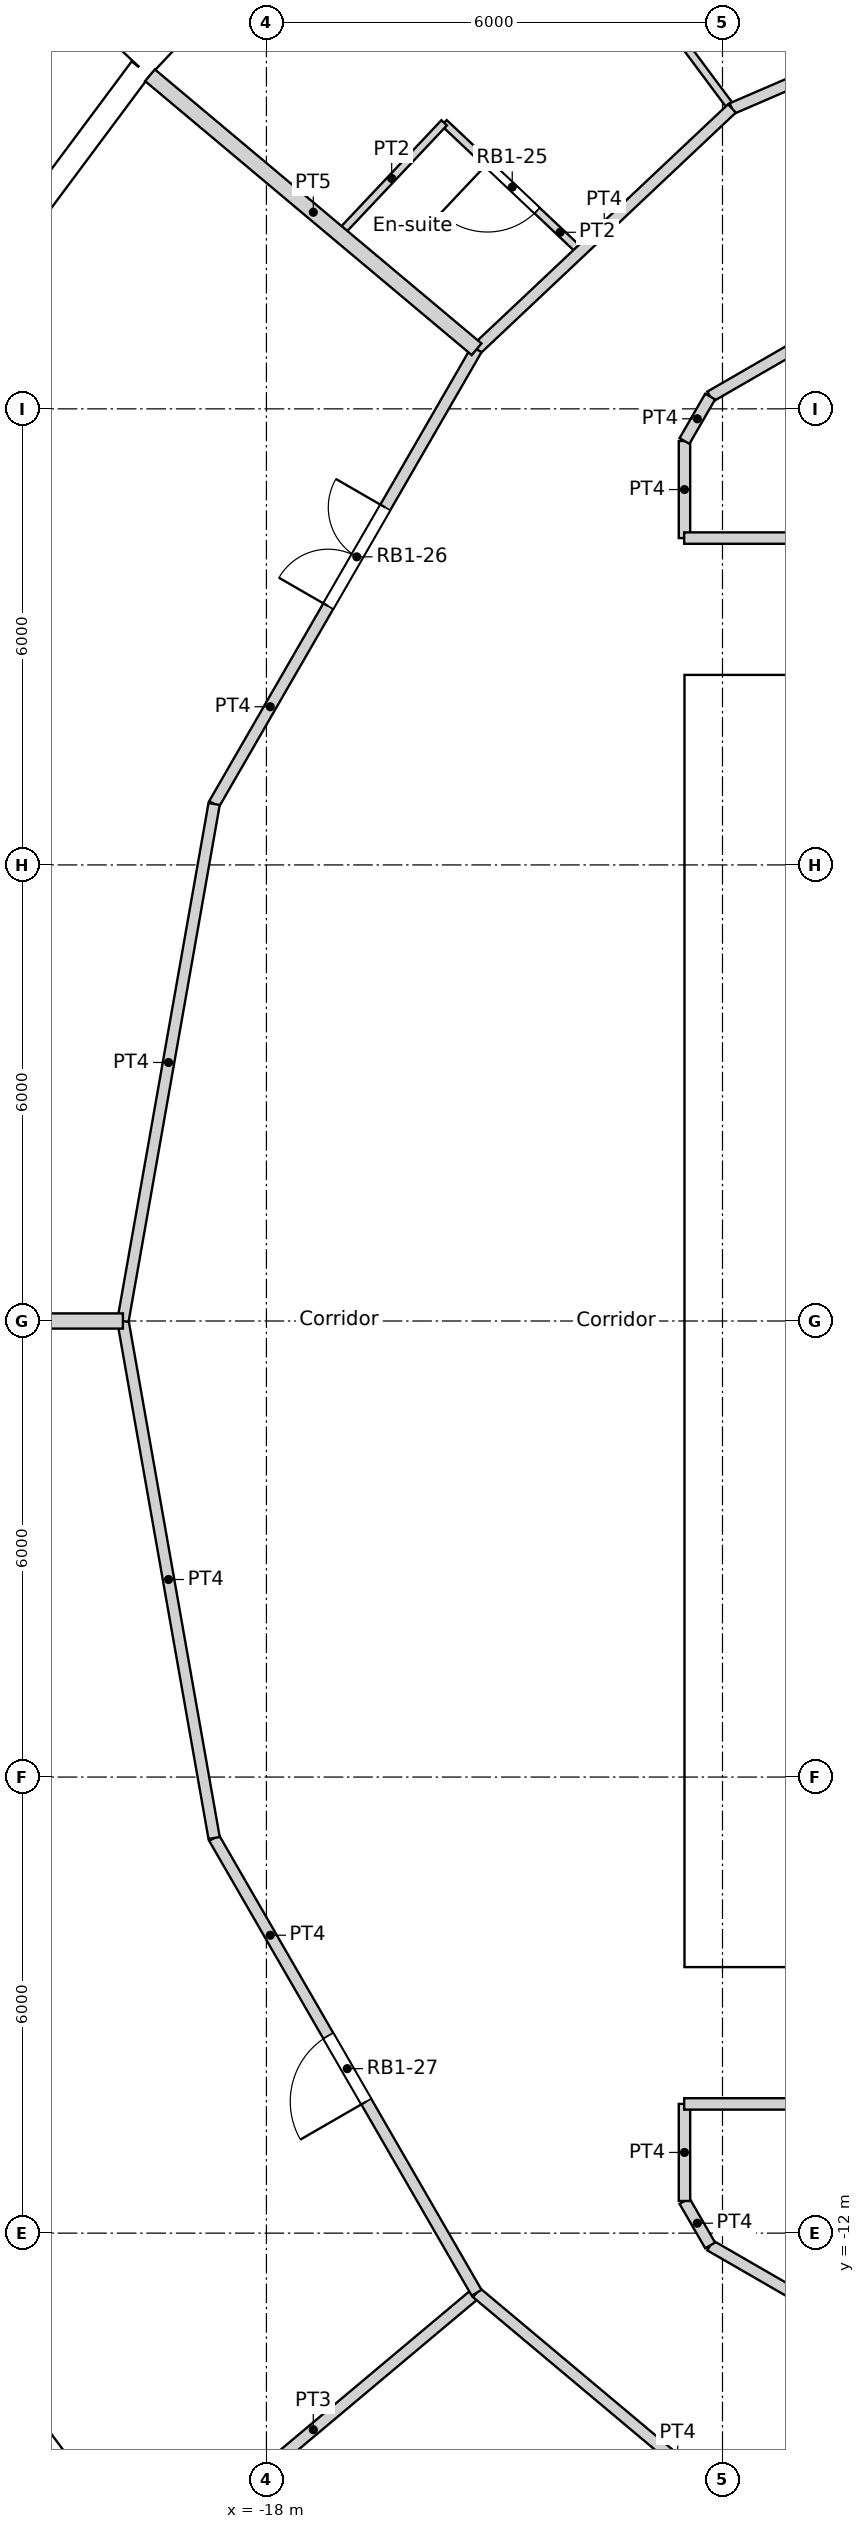
"""IFC4 building model, lengths in metres.
Left out: names, types, materials, properties, quantities, classifications, styles, units other than length and angle.
Written with IfcOpenShell. Run it as: python <this file> out.ifc"""

import sys

from ifc_helpers import new_model, si_unit, direction, frame, frame_2d, origin, origin_2d, place, context, subcontext, project, spatial, rectangle, circle, extrude, element, fill, save


model = new_model("IFC4")
c1 = context("Model", 3, precision=1e-05, world=origin(), true_north=direction((0.0, 1.0)))
c2 = subcontext(c1, "Body", "Model", "MODEL_VIEW")
j1 = project(units=[si_unit("LENGTHUNIT", "METRE"), si_unit("PLANEANGLEUNIT", "RADIAN")], contexts=[c1])
p1 = place(None, origin())
s1 = spatial("IfcSite", under=j1, at=p1, CompositionType="ELEMENT")
p2 = place(p1, origin())
s2 = spatial("IfcBuilding", under=s1, at=p2, CompositionType="ELEMENT")
p3 = place(p2, frame((0.0, 0.0, 126.0)))
s3 = spatial("IfcBuildingStorey", under=s2, at=p3, CompositionType="ELEMENT", Elevation=126.0)
for number, where, z_axis, x_axis in (
    (1, (-20.509, 13.489, 0.0), (0.0, 0.0, 1.0), (1.0, 0.0, 0.0)),
    (2, (-20.509, -13.489, 0.0), (0.0, 0.0, 1.0), (1.0, 0.0, 0.0)),
):
    element("IfcColumn", number, at=place(p3, frame(where, z_axis=z_axis, x_axis=x_axis)), inside=s3, PredefinedType="COLUMN", context=c2, shape_type="SweptSolid", body=[
        extrude(circle(Radius=0.6, at=origin_2d()), origin(), (0.0, 0.0, 1.0), 3.6),
    ])
for number, where, z_axis, x_axis in (
    (3, (-13.798, 12.802, 0.0), (0.0, 0.0, 1.0), (1.0, 0.0, 0.0)),
    (4, (-16.958, 8.167, 0.0), (0.0, 0.0, 1.0), (1.0, 0.0, 0.0)),
    (5, (-18.612, 2.805, 0.0), (0.0, 0.0, 1.0), (1.0, 0.0, 0.0)),
    (6, (-18.612, -2.805, 0.0), (0.0, 0.0, 1.0), (1.0, 0.0, 0.0)),
    (7, (-16.958, -8.167, 0.0), (0.0, 0.0, 1.0), (1.0, 0.0, 0.0)),
    (8, (-13.798, -12.802, 0.0), (0.0, 0.0, 1.0), (1.0, 0.0, 0.0)),
):
    element("IfcColumn", number, at=place(p3, frame(where, z_axis=z_axis, x_axis=x_axis)), inside=s3, PredefinedType="COLUMN", context=c2, shape_type="SweptSolid", body=[
        extrude(circle(Radius=0.65, at=origin_2d()), origin(), (0.0, 0.0, 1.0), 3.6),
    ])
p4 = place(p3, frame((-18.013, 19.056, -0.3), z_axis=(0.0, 0.0, 1.0), x_axis=(-0.686217177108, -0.727396718334, 0.0)))
e9 = element("IfcWall", 9, at=p4, inside=s3, PredefinedType="ELEMENTEDWALL", context=c2, shape_type="SweptSolid", body=[
    extrude(rectangle(XDim=3.0, YDim=1.45, at=frame_2d((1.5, 0.0))), origin(), (0.0, 0.0, 1.0), 3.6),
])
p5 = place(p4, frame((1.5, 0.0, 1.85)))
e10 = element("IfcOpeningElement", 10, at=p5, cuts=e9, PredefinedType="OPENING", context=c2, shape_type="SweptSolid", body=[
    extrude(circle(Radius=0.9, at=origin_2d()), frame((0.0, 0.735, 0.0), z_axis=(0.0, -1.0, 0.0), x_axis=(1.0, 0.0, 0.0)), (0.0, 0.0, 1.0), 1.47),
])
p6 = place(p3, frame((-19.653, 16.478, 0.0), z_axis=(0.0, 0.0, 1.0), x_axis=(-0.597197580538, -0.80209416517, 0.0)))
e11 = element("IfcWall", 11, at=p6, inside=s3, PredefinedType="SOLIDWALL", context=c2, shape_type="SweptSolid", body=[
    extrude(rectangle(XDim=2.973, YDim=0.3, at=frame_2d((1.486, 0.0))), origin(), (0.0, 0.0, 1.0), 3.3),
])
p7 = place(p6, frame((1.486, 0.0, 1.55)))
e12 = element("IfcOpeningElement", 12, at=p7, cuts=e11, PredefinedType="OPENING", context=c2, shape_type="SweptSolid", body=[
    extrude(circle(Radius=0.9, at=origin_2d()), frame((0.0, 0.16, 0.0), z_axis=(0.0, -1.0, 0.0), x_axis=(1.0, 0.0, 0.0)), (0.0, 0.0, 1.0), 0.32),
])
p8 = place(p3, frame((-21.895, -14.43, -0.3), z_axis=(0.0, 0.0, 1.0), x_axis=(0.597183717734, -0.802104486506, 0.0)))
e13 = element("IfcWall", 13, at=p8, inside=s3, PredefinedType="ELEMENTEDWALL", context=c2, shape_type="SweptSolid", body=[
    extrude(rectangle(XDim=3.0, YDim=1.45, at=frame_2d((1.5, 0.0))), origin(), (0.0, 0.0, 1.0), 3.6),
])
p9 = place(p8, frame((1.5, 0.0, 1.85)))
e14 = element("IfcOpeningElement", 14, at=p9, cuts=e13, PredefinedType="OPENING", context=c2, shape_type="SweptSolid", body=[
    extrude(circle(Radius=0.9, at=origin_2d()), frame((0.0, 0.735, 0.0), z_axis=(0.0, -1.0, 0.0), x_axis=(1.0, 0.0, 0.0)), (0.0, 0.0, 1.0), 1.47),
])
p10 = place(p3, frame((-12.5, -8.05, 0.0), z_axis=(0.0, 0.0, 1.0), x_axis=(1.0, 0.0, 0.0)))
e15 = element("IfcWall", 15, at=p10, inside=s3, PredefinedType="SOLIDWALL", context=c2, shape_type="SweptSolid", body=[
    extrude(rectangle(XDim=25.0, YDim=0.9, at=frame_2d((12.5, 0.0))), origin(), (0.0, 0.0, 1.0), 3.6),
])
p11 = place(p10, frame((13.4, 0.0, 0.0)))
e16 = element("IfcOpeningElement", 16, at=p11, cuts=e15, PredefinedType="OPENING", context=c2, shape_type="SweptSolid", body=[
    extrude(rectangle(XDim=1.0, YDim=2.1, at=frame_2d((0.5, 1.05))), frame((0.0, 0.45, 0.0), z_axis=(0.0, -1.0, 0.0), x_axis=(1.0, 0.0, 0.0)), (0.0, 0.0, 1.0), 0.9),
])
p12 = place(p10, frame((8.3, 0.0, 0.0)))
e17 = element("IfcOpeningElement", 17, at=p12, cuts=e15, PredefinedType="OPENING", context=c2, shape_type="SweptSolid", body=[
    extrude(rectangle(XDim=1.8, YDim=2.1, at=frame_2d((0.9, 1.05))), frame((0.0, 0.45, 0.0), z_axis=(0.0, -1.0, 0.0), x_axis=(1.0, 0.0, 0.0)), (0.0, 0.0, 1.0), 0.9),
])
p13 = place(p10, frame((14.9, 0.0, 0.0)))
e18 = element("IfcOpeningElement", 18, at=p13, cuts=e15, PredefinedType="OPENING", context=c2, shape_type="SweptSolid", body=[
    extrude(rectangle(XDim=1.8, YDim=2.1, at=frame_2d((0.9, 1.05))), frame((0.0, 0.45, 0.0), z_axis=(0.0, -1.0, 0.0), x_axis=(1.0, 0.0, 0.0)), (0.0, 0.0, 1.0), 0.9),
])
p14 = place(p3, frame((-12.5, 8.05, 0.0), z_axis=(0.0, 0.0, 1.0), x_axis=(1.0, 0.0, 0.0)))
e19 = element("IfcWall", 19, at=p14, inside=s3, PredefinedType="SOLIDWALL", context=c2, shape_type="SweptSolid", body=[
    extrude(rectangle(XDim=25.0, YDim=0.9, at=frame_2d((12.5, 0.0))), origin(), (0.0, 0.0, 1.0), 3.6),
])
p15 = place(p14, frame((8.3, 0.0, 0.0)))
e20 = element("IfcOpeningElement", 20, at=p15, cuts=e19, PredefinedType="OPENING", context=c2, shape_type="SweptSolid", body=[
    extrude(rectangle(XDim=1.8, YDim=2.1, at=frame_2d((0.9, 1.05))), frame((0.0, 0.45, 0.0), z_axis=(0.0, -1.0, 0.0), x_axis=(1.0, 0.0, 0.0)), (0.0, 0.0, 1.0), 0.9),
])
p16 = place(p3, frame((-12.05, -7.6, 0.0), z_axis=(0.0, 0.0, 1.0), x_axis=(0.0, 1.0, 0.0)))
e21 = element("IfcWall", 21, at=p16, inside=s3, PredefinedType="SOLIDWALL", context=c2, shape_type="SweptSolid", body=[
    extrude(rectangle(XDim=15.2, YDim=0.9, at=frame_2d((7.6, 0.0))), origin(), (0.0, 0.0, 1.0), 3.6),
])
p17 = place(p16, frame((7.1, 0.0, 0.0)))
e22 = element("IfcOpeningElement", 22, at=p17, cuts=e21, PredefinedType="OPENING", context=c2, shape_type="SweptSolid", body=[
    extrude(rectangle(XDim=1.0, YDim=2.1, at=frame_2d((0.5, 1.05))), frame((0.0, 0.45, 0.0), z_axis=(0.0, -1.0, 0.0), x_axis=(1.0, 0.0, 0.0)), (0.0, 0.0, 1.0), 0.9),
])
p18 = place(p3, frame((-11.6, -4.55, 0.0), z_axis=(0.0, 0.0, 1.0), x_axis=(1.0, 0.0, 0.0)))
e23 = element("IfcWall", 23, at=p18, inside=s3, PredefinedType="SOLIDWALL", context=c2, shape_type="SweptSolid", body=[
    extrude(rectangle(XDim=2.4, YDim=0.3, at=frame_2d((1.2, 0.0))), origin(), (0.0, 0.0, 1.0), 3.3),
])
p19 = place(p18, frame((0.65, 0.0, 0.0)))
e24 = element("IfcOpeningElement", 24, at=p19, cuts=e23, PredefinedType="OPENING", context=c2, shape_type="SweptSolid", body=[
    extrude(rectangle(XDim=1.1, YDim=2.1, at=frame_2d((0.55, 1.05))), frame((0.0, 0.15, 0.0), z_axis=(0.0, -1.0, 0.0), x_axis=(1.0, 0.0, 0.0)), (0.0, 0.0, 1.0), 0.3),
])
p20 = place(p3, frame((-11.6, 4.55, 0.0), z_axis=(0.0, 0.0, 1.0), x_axis=(1.0, 0.0, 0.0)))
e25 = element("IfcWall", 25, at=p20, inside=s3, PredefinedType="SOLIDWALL", context=c2, shape_type="SweptSolid", body=[
    extrude(rectangle(XDim=2.4, YDim=0.3, at=frame_2d((1.2, 0.0))), origin(), (0.0, 0.0, 1.0), 3.3),
])
p21 = place(p20, frame((0.65, 0.0, 0.0)))
e26 = element("IfcOpeningElement", 26, at=p21, cuts=e25, PredefinedType="OPENING", context=c2, shape_type="SweptSolid", body=[
    extrude(rectangle(XDim=1.1, YDim=2.1, at=frame_2d((0.55, 1.05))), frame((0.0, 0.15, 0.0), z_axis=(0.0, -1.0, 0.0), x_axis=(1.0, 0.0, 0.0)), (0.0, 0.0, 1.0), 0.3),
])
for number, where, z_axis, x_axis in (
    (27, (-12.504, 10.3, 0.0), (0.0, 0.0, 1.0), (1.0, 0.0, 0.0)),
    (28, (-12.504, -10.3, 0.0), (0.0, 0.0, 1.0), (1.0, 0.0, 0.0)),
):
    element("IfcWall", number, at=place(p3, frame(where, z_axis=z_axis, x_axis=x_axis)), inside=s3, PredefinedType="PARTITIONING", context=c2, shape_type="SweptSolid", body=[
        extrude(rectangle(XDim=7.687, YDim=0.15, at=frame_2d((3.844, 0.0))), origin(), (0.0, 0.0, 1.0), 3.3),
    ])
p22 = place(p3, frame((-12.162, 12.162, 0.0), z_axis=(0.0, 0.0, 1.0), x_axis=(0.866004766557, 0.500035743023, 0.0)))
e29 = element("IfcWall", 29, at=p22, inside=s3, PredefinedType="PARTITIONING", context=c2, shape_type="SweptSolid", body=[
    extrude(rectangle(XDim=8.477, YDim=0.15, at=frame_2d((4.239, 0.0))), origin(), (0.0, 0.0, 1.0), 3.3),
])
p23 = place(p22, frame((3.739, 0.0, 0.0)))
e30 = element("IfcOpeningElement", 30, at=p23, cuts=e29, PredefinedType="OPENING", context=c2, shape_type="SweptSolid", body=[
    extrude(rectangle(XDim=1.0, YDim=2.04, at=frame_2d((0.5, 1.02))), frame((0.0, 0.075, 0.0), z_axis=(0.0, -1.0, 0.0), x_axis=(1.0, 0.0, 0.0)), (0.0, 0.0, 1.0), 0.15),
])
p24 = place(p3, frame((-11.876, 15.952, 0.0), z_axis=(0.0, 0.0, 1.0), x_axis=(0.918189765505, 0.396140826629, 0.0)))
e31 = element("IfcWall", 31, at=p24, inside=s3, PredefinedType="PARTITIONING", context=c2, shape_type="SweptSolid", body=[
    extrude(rectangle(XDim=9.174, YDim=0.15, at=frame_2d((4.587, 0.0))), origin(), (0.0, 0.0, 1.0), 3.3),
])
p25 = place(p24, frame((3.51, 0.0, 0.0)))
e32 = element("IfcOpeningElement", 32, at=p25, cuts=e31, PredefinedType="OPENING", context=c2, shape_type="SweptSolid", body=[
    extrude(rectangle(XDim=1.1, YDim=2.1, at=frame_2d((0.55, 1.05))), frame((0.0, 0.075, 0.0), z_axis=(0.0, -1.0, 0.0), x_axis=(1.0, 0.0, 0.0)), (0.0, 0.0, 1.0), 0.15),
])
p26 = place(p3, frame((-15.235, 12.784, 0.0), z_axis=(0.0, 0.0, 1.0), x_axis=(0.7275818654, 0.686020866403, 0.0)))
e33 = element("IfcWall", 33, at=p26, inside=s3, PredefinedType="PARTITIONING", context=c2, shape_type="SweptSolid", body=[
    extrude(rectangle(XDim=4.617, YDim=0.15, at=frame_2d((2.309, 0.0))), origin(), (0.0, 0.0, 1.0), 3.3),
])
p27 = place(p3, frame((-12.5, 11.577, 0.0), z_axis=(0.0, 0.0, 1.0), x_axis=(0.500024767483, 0.866011103799, 0.0)))
e34 = element("IfcWall", 34, at=p27, inside=s3, PredefinedType="PARTITIONING", context=c2, shape_type="SweptSolid", body=[
    extrude(rectangle(XDim=0.676, YDim=0.15, at=frame_2d((0.338, 0.0))), origin(), (0.0, 0.0, 1.0), 3.3),
])
for number, where, z_axis, x_axis in (
    (35, (-12.5, 10.3, 0.0), (0.0, 0.0, 1.0), (0.0, 1.0, 0.0)),
    (36, (-12.5, -11.577, 0.0), (0.0, 0.0, 1.0), (0.0, 1.0, 0.0)),
):
    element("IfcWall", number, at=place(p3, frame(where, z_axis=z_axis, x_axis=x_axis)), inside=s3, PredefinedType="PARTITIONING", context=c2, shape_type="SweptSolid", body=[
        extrude(rectangle(XDim=1.277, YDim=0.15, at=frame_2d((0.638, 0.0))), origin(), (0.0, 0.0, 1.0), 3.3),
    ])
p28 = place(p3, frame((-12.5, -11.577, 0.0), z_axis=(0.0, 0.0, 1.0), x_axis=(0.500024767483, -0.866011103799, 0.0)))
e37 = element("IfcWall", 37, at=p28, inside=s3, PredefinedType="PARTITIONING", context=c2, shape_type="SweptSolid", body=[
    extrude(rectangle(XDim=0.676, YDim=0.15, at=frame_2d((0.338, 0.0))), origin(), (0.0, 0.0, 1.0), 3.3),
])
p29 = place(p3, frame((-19.888, 0.0, 0.0), z_axis=(0.0, 0.0, 1.0), x_axis=(0.173728873845, 0.98479352069, 0.0)))
e38 = element("IfcWall", 38, at=p29, inside=s3, PredefinedType="PARTITIONING", context=c2, shape_type="SweptSolid", body=[
    extrude(rectangle(XDim=6.907, YDim=0.15, at=frame_2d((3.454, 0.0))), origin(), (0.0, 0.0, 1.0), 3.3),
])
p30 = place(p3, frame((-18.688, 6.802, 0.0), z_axis=(0.0, 0.0, 1.0), x_axis=(0.499914202267, 0.866074933462, 0.0)))
e39 = element("IfcWall", 39, at=p30, inside=s3, PredefinedType="PARTITIONING", context=c2, shape_type="SweptSolid", body=[
    extrude(rectangle(XDim=6.907, YDim=0.15, at=frame_2d((3.454, 0.0))), origin(), (0.0, 0.0, 1.0), 3.3),
])
p31 = place(p30, frame((3.004, 0.0, 0.0)))
e40 = element("IfcOpeningElement", 40, at=p31, cuts=e39, PredefinedType="OPENING", context=c2, shape_type="SweptSolid", body=[
    extrude(rectangle(XDim=1.5, YDim=2.1, at=frame_2d((0.75, 1.05))), frame((0.0, 0.075, 0.0), z_axis=(0.0, -1.0, 0.0), x_axis=(1.0, 0.0, 0.0)), (0.0, 0.0, 1.0), 0.15),
])
p32 = place(p3, frame((-18.688, -6.802, 0.0), z_axis=(0.0, 0.0, 1.0), x_axis=(0.499914202267, -0.866074933462, 0.0)))
e41 = element("IfcWall", 41, at=p32, inside=s3, PredefinedType="PARTITIONING", context=c2, shape_type="SweptSolid", body=[
    extrude(rectangle(XDim=6.907, YDim=0.15, at=frame_2d((3.454, 0.0))), origin(), (0.0, 0.0, 1.0), 3.3),
])
p33 = place(p32, frame((3.003, 0.0, 0.0)))
e42 = element("IfcOpeningElement", 42, at=p33, cuts=e41, PredefinedType="OPENING", context=c2, shape_type="SweptSolid", body=[
    extrude(rectangle(XDim=1.0, YDim=2.04, at=frame_2d((0.5, 1.02))), frame((0.0, 0.075, 0.0), z_axis=(0.0, -1.0, 0.0), x_axis=(1.0, 0.0, 0.0)), (0.0, 0.0, 1.0), 0.15),
])
p34 = place(p3, frame((-19.888, 0.0, 0.0), z_axis=(0.0, 0.0, 1.0), x_axis=(0.173728873845, -0.98479352069, 0.0)))
e43 = element("IfcWall", 43, at=p34, inside=s3, PredefinedType="PARTITIONING", context=c2, shape_type="SweptSolid", body=[
    extrude(rectangle(XDim=6.907, YDim=0.15, at=frame_2d((3.454, 0.0))), origin(), (0.0, 0.0, 1.0), 3.3),
])
p35 = place(p3, frame((-15.235, -12.784, 0.0), z_axis=(0.0, 0.0, 1.0), x_axis=(0.766192104565, -0.642611592567, 0.0)))
e44 = element("IfcWall", 44, at=p35, inside=s3, PredefinedType="PARTITIONING", context=c2, shape_type="SweptSolid", body=[
    extrude(rectangle(XDim=6.906, YDim=0.15, at=frame_2d((3.453, 0.0))), origin(), (0.0, 0.0, 1.0), 3.3),
])
p36 = place(p3, frame((-12.162, -12.162, 0.0), z_axis=(0.0, 0.0, 1.0), x_axis=(0.866004766557, -0.500035743023, 0.0)))
e45 = element("IfcWall", 45, at=p36, inside=s3, PredefinedType="PARTITIONING", context=c2, shape_type="SweptSolid", body=[
    extrude(rectangle(XDim=8.477, YDim=0.15, at=frame_2d((4.239, 0.0))), origin(), (0.0, 0.0, 1.0), 3.3),
])
p37 = place(p36, frame((3.763, 0.0, 0.0)))
e46 = element("IfcOpeningElement", 46, at=p37, cuts=e45, PredefinedType="OPENING", context=c2, shape_type="SweptSolid", body=[
    extrude(rectangle(XDim=0.95, YDim=2.1, at=frame_2d((0.475, 1.05))), frame((0.0, 0.075, 0.0), z_axis=(0.0, -1.0, 0.0), x_axis=(1.0, 0.0, 0.0)), (0.0, 0.0, 1.0), 0.15),
])
p38 = place(p3, frame((-15.226, 20.452, 0.0), z_axis=(0.0, 0.0, 1.0), x_axis=(0.597155355437, -0.802125602056, 0.0)))
e47 = element("IfcWall", 47, at=p38, inside=s3, PredefinedType="PARTITIONING", context=c2, shape_type="SweptSolid", body=[
    extrude(rectangle(XDim=5.61, YDim=0.1, at=frame_2d((2.805, 0.0))), origin(), (0.0, 0.0, 1.0), 3.3),
])
p39 = place(p38, frame((2.139, 0.0, 0.0)))
e48 = element("IfcOpeningElement", 48, at=p39, cuts=e47, PredefinedType="OPENING", context=c2, shape_type="SweptSolid", body=[
    extrude(rectangle(XDim=0.9, YDim=2.1, at=frame_2d((0.45, 1.05))), frame((0.0, 0.05, 0.0), z_axis=(0.0, -1.0, 0.0), x_axis=(1.0, 0.0, 0.0)), (0.0, 0.0, 1.0), 0.1),
])
p40 = place(p3, frame((-15.662, 15.763, 0.0), z_axis=(0.0, 0.0, 1.0), x_axis=(0.727320856717, -0.686297582237, 0.0)))
e49 = element("IfcWall", 49, at=p40, inside=s3, PredefinedType="PARTITIONING", context=c2, shape_type="SweptSolid", body=[
    extrude(rectangle(XDim=2.464, YDim=0.1, at=frame_2d((1.232, 0.0))), origin(), (0.0, 0.0, 1.0), 3.3),
])
p41 = place(p40, frame((0.782, 0.0, 0.0)))
e50 = element("IfcOpeningElement", 50, at=p41, cuts=e49, PredefinedType="OPENING", context=c2, shape_type="SweptSolid", body=[
    extrude(rectangle(XDim=0.9, YDim=2.04, at=frame_2d((0.45, 1.02))), frame((0.0, 0.05, 0.0), z_axis=(0.0, -1.0, 0.0), x_axis=(1.0, 0.0, 0.0)), (0.0, 0.0, 1.0), 0.1),
])
p42 = place(p3, frame((-17.042, 14.3, 0.0), z_axis=(0.0, 0.0, 1.0), x_axis=(0.686167098493, 0.727443958629, 0.0)))
e51 = element("IfcWall", 51, at=p42, inside=s3, PredefinedType="PARTITIONING", context=c2, shape_type="SweptSolid", body=[
    extrude(rectangle(XDim=2.011, YDim=0.1, at=frame_2d((1.005, 0.0))), origin(), (0.0, 0.0, 1.0), 3.3),
])
p43 = place(p3, frame((-19.532, 16.389, 0.0), z_axis=(0.0, 0.0, 1.0), x_axis=(0.76609059793, -0.642732600514, 0.0)))
e52 = element("IfcWall", 52, at=p43, inside=s3, PredefinedType="PARTITIONING", context=c2, shape_type="SweptSolid", body=[
    extrude(rectangle(XDim=5.609, YDim=0.2, at=frame_2d((2.804, 0.0))), origin(), (0.0, 0.0, 1.0), 3.3),
])
p44 = place(p3, frame((-25.497, 0.0, 0.0), z_axis=(0.0, 0.0, 1.0), x_axis=(1.0, 0.0, 0.0)))
e53 = element("IfcWall", 53, at=p44, inside=s3, PredefinedType="PARTITIONING", context=c2, shape_type="SweptSolid", body=[
    extrude(rectangle(XDim=5.609, YDim=0.2, at=frame_2d((2.805, 0.0))), origin(), (0.0, 0.0, 1.0), 3.3),
])
p45 = place(p3, frame((-19.532, -16.389, 0.0), z_axis=(0.0, 0.0, 1.0), x_axis=(0.76609059793, 0.642732600514, 0.0)))
e54 = element("IfcWall", 54, at=p45, inside=s3, PredefinedType="PARTITIONING", context=c2, shape_type="SweptSolid", body=[
    extrude(rectangle(XDim=5.609, YDim=0.15, at=frame_2d((2.804, 0.0))), origin(), (0.0, 0.0, 1.0), 3.3),
])
p46 = place(p7, origin())
e55 = element("IfcWindow", 55, at=p46, inside=s3, PartitioningType="SINGLE_PANEL", PredefinedType="WINDOW", context=c2, shape_type="SweptSolid", body=[
    extrude(circle(Radius=0.9, at=origin_2d()), frame((0.0, 0.12, 0.0), z_axis=(0.0, -1.0, 0.0), x_axis=(1.0, 0.0, 0.0)), (0.0, 0.0, 1.0), 0.1),
])
fill(e12, e55)
p47 = place(p9, origin())
e56 = element("IfcWindow", 56, at=p47, inside=s3, PartitioningType="SINGLE_PANEL", PredefinedType="WINDOW", context=c2, shape_type="SweptSolid", body=[
    extrude(circle(Radius=0.9, at=origin_2d()), frame((0.0, 0.695, 0.0), z_axis=(0.0, -1.0, 0.0), x_axis=(1.0, 0.0, 0.0)), (0.0, 0.0, 1.0), 0.1),
])
fill(e14, e56)
p48 = place(p17, origin())
e57 = element("IfcDoor", 57, at=p48, inside=s3, OperationType="DOUBLE_DOOR_SINGLE_SWING", PredefinedType="DOOR", context=c2, shape_type="SweptSolid", body=[
    extrude(rectangle(XDim=1.0, YDim=2.1, at=frame_2d((0.5, 1.05))), frame((0.0, 0.025, 0.0), z_axis=(0.0, -1.0, 0.0), x_axis=(1.0, 0.0, 0.0)), (0.0, 0.0, 1.0), 0.05),
])
fill(e22, e57)
p49 = place(p41, origin())
e58 = element("IfcDoor", 58, at=p49, inside=s3, OperationType="SINGLE_SWING_RIGHT", PredefinedType="DOOR", context=c2, shape_type="SweptSolid", body=[
    extrude(rectangle(XDim=0.9, YDim=2.04, at=frame_2d((0.45, 1.02))), frame((0.0, 0.025, 0.0), z_axis=(0.0, -1.0, 0.0), x_axis=(1.0, 0.0, 0.0)), (0.0, 0.0, 1.0), 0.05),
])
fill(e50, e58)
p50 = place(p31, origin())
e59 = element("IfcDoor", 59, at=p50, inside=s3, OperationType="DOUBLE_DOOR_SINGLE_SWING", PredefinedType="DOOR", context=c2, shape_type="SweptSolid", body=[
    extrude(rectangle(XDim=1.5, YDim=2.1, at=frame_2d((0.75, 1.05))), frame((0.0, 0.025, 0.0), z_axis=(0.0, -1.0, 0.0), x_axis=(1.0, 0.0, 0.0)), (0.0, 0.0, 1.0), 0.05),
])
fill(e40, e59)
p51 = place(p33, origin())
e60 = element("IfcDoor", 60, at=p51, inside=s3, OperationType="SINGLE_SWING_LEFT", PredefinedType="DOOR", context=c2, shape_type="SweptSolid", body=[
    extrude(rectangle(XDim=1.0, YDim=2.04, at=frame_2d((0.5, 1.02))), frame((0.0, 0.025, 0.0), z_axis=(0.0, -1.0, 0.0), x_axis=(1.0, 0.0, 0.0)), (0.0, 0.0, 1.0), 0.05),
])
fill(e42, e60)
save(model, sys.argv[1])
